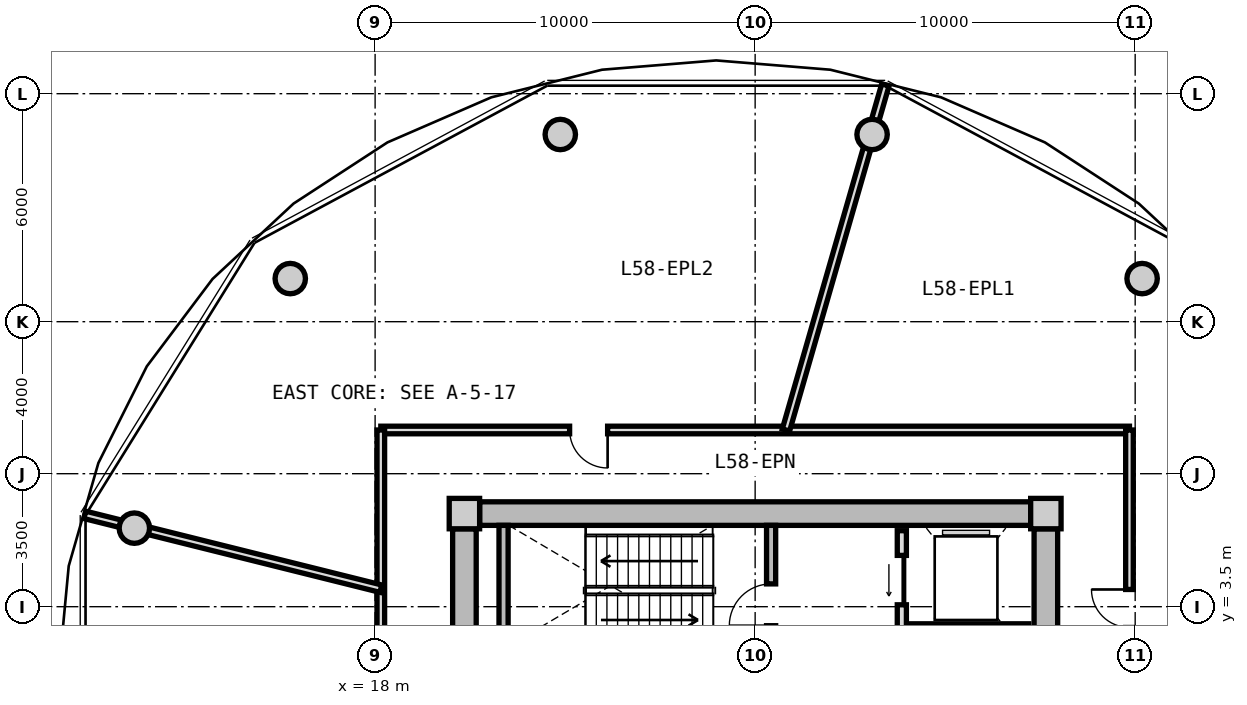
"""IFC4 building model, lengths in metres.
Left out: names, types, materials, properties, quantities, classifications, styles, units other than length and angle.
Written with IfcOpenShell. Run it as: python <this file> out.ifc"""

import sys

from ifc_helpers import new_model, si_unit, direction, frame, frame_2d, origin, origin_2d, place, context, subcontext, project, spatial, rectangle, circle, extrude, source, transform, mapped, element, fill, save


model = new_model("IFC4")
c1 = context("Model", 3, precision=1e-05, world=origin(), true_north=direction((0.0, 1.0)))
c2 = subcontext(c1, "Body", "Model", "MODEL_VIEW")
j1 = project(units=[si_unit("LENGTHUNIT", "METRE"), si_unit("PLANEANGLEUNIT", "RADIAN")], contexts=[c1])
p1 = place(None, origin())
s1 = spatial("IfcSite", under=j1, at=p1, CompositionType="ELEMENT")
p2 = place(p1, origin())
s2 = spatial("IfcBuilding", under=s1, at=p2, CompositionType="ELEMENT")
p3 = place(p2, frame((0.0, 0.0, 186.15)))
s3 = spatial("IfcBuildingStorey", under=s2, at=p3, CompositionType="ELEMENT", Elevation=186.15)
m1 = source(origin(), c2, "Body", "SweptSolid", [
    extrude(rectangle(XDim=0.8, YDim=0.8, at=origin_2d()), origin(), (0.0, 0.0, 1.0), 4.5),
])
for number, where, z_axis, x_axis in (
    (1, (35.65, 5.95, 0.0), (0.0, 0.0, 1.0), (1.0, 0.0, 0.0)),
    (2, (20.35, 5.95, 0.0), (0.0, 0.0, 1.0), (1.0, 0.0, 0.0)),
):
    element("IfcColumn", number, at=place(p3, frame(where, z_axis=z_axis, x_axis=x_axis)), inside=s3, PredefinedType="COLUMN", context=c2, shape_type="MappedRepresentation", body=[
        mapped(m1, transform((0.0, 0.0, 0.0), x_axis=(1.0, 0.0, 0.0), y_axis=(0.0, 1.0, 0.0), z_axis=(0.0, 0.0, 1.0), scale=1.0)),
    ])
m2 = source(origin(), c2, "Body", "SweptSolid", [
    extrude(rectangle(XDim=14.5, YDim=0.62, at=frame_2d((7.25, 0.0))), origin(), (0.0, 0.0, 1.0), 4.08),
])
p4 = place(p3, frame((20.75, 5.95, 0.0), z_axis=(0.0, 0.0, 1.0), x_axis=(1.0, 0.0, 0.0)))
e3 = element("IfcWall", 3, at=p4, inside=s3, PredefinedType="SHEAR", context=c2, shape_type="MappedRepresentation", body=[
    mapped(m2, transform((0.0, 0.0, 0.0), x_axis=(1.0, 0.0, 0.0), y_axis=(0.0, 1.0, 0.0), z_axis=(0.0, 0.0, 1.0), scale=1.0)),
])
m3 = source(origin(), c2, "Body", "SweptSolid", [
    extrude(rectangle(XDim=11.1, YDim=0.62, at=frame_2d((5.55, 0.0))), origin(), (0.0, 0.0, 1.0), 4.08),
])
p5 = place(p3, frame((20.35, -5.55, 0.0), z_axis=(0.0, 0.0, 1.0), x_axis=(0.0, 1.0, 0.0)))
e4 = element("IfcWall", 4, at=p5, inside=s3, PredefinedType="SHEAR", context=c2, shape_type="MappedRepresentation", body=[
    mapped(m3, transform((0.0, 0.0, 0.0), x_axis=(1.0, 0.0, 0.0), y_axis=(0.0, 1.0, 0.0), z_axis=(0.0, 0.0, 1.0), scale=1.0)),
])
p6 = place(p5, frame((3.8, 0.0, 0.0)))
e5 = element("IfcOpeningElement", 5, at=p6, cuts=e4, PredefinedType="OPENING", context=c2, shape_type="SweptSolid", body=[
    extrude(rectangle(XDim=1.2, YDim=2.15, at=frame_2d((0.6, 1.075))), frame((0.0, 0.32, 0.0), z_axis=(0.0, -1.0, 0.0), x_axis=(1.0, 0.0, 0.0)), (0.0, 0.0, 1.0), 0.64),
])
p7 = place(p3, frame((35.65, 5.55, 0.0), z_axis=(0.0, 0.0, 1.0), x_axis=(0.0, -1.0, 0.0)))
e6 = element("IfcWall", 6, at=p7, inside=s3, PredefinedType="SHEAR", context=c2, shape_type="MappedRepresentation", body=[
    mapped(m3, transform((0.0, 0.0, 0.0), x_axis=(1.0, 0.0, 0.0), y_axis=(0.0, 1.0, 0.0), z_axis=(0.0, 0.0, 1.0), scale=1.0)),
])
p8 = place(p7, frame((5.65, 0.0, 0.0)))
e7 = element("IfcOpeningElement", 7, at=p8, cuts=e6, PredefinedType="OPENING", context=c2, shape_type="SweptSolid", body=[
    extrude(rectangle(XDim=1.2, YDim=2.15, at=frame_2d((0.6, 1.075))), frame((0.0, 0.32, 0.0), z_axis=(0.0, -1.0, 0.0), x_axis=(1.0, 0.0, 0.0)), (0.0, 0.0, 1.0), 0.64),
])
p9 = place(p7, frame((9.3, 0.0, 0.0)))
e8 = element("IfcOpeningElement", 8, at=p9, cuts=e6, PredefinedType="OPENING", context=c2, shape_type="SweptSolid", body=[
    extrude(rectangle(XDim=1.0, YDim=2.1, at=frame_2d((0.5, 1.05))), frame((0.0, 0.32, 0.0), z_axis=(0.0, -1.0, 0.0), x_axis=(1.0, 0.0, 0.0)), (0.0, 0.0, 1.0), 0.64),
])
m4 = source(origin(), c2, "Body", "SweptSolid", [
    extrude(circle(Radius=0.4, at=origin_2d()), origin(), (0.0, 0.0, 1.0), 4.08),
])
for number, where, z_axis, x_axis in (
    (9, (38.183, 12.135, 0.0), (0.0, 0.0, 1.0), (1.0, 0.0, 0.0)),
    (10, (31.077, 15.926, 0.0), (0.0, 0.0, 1.0), (1.0, 0.0, 0.0)),
    (11, (22.873, 15.926, 0.0), (0.0, 0.0, 1.0), (1.0, 0.0, 0.0)),
    (12, (15.767, 12.135, 0.0), (0.0, 0.0, 1.0), (1.0, 0.0, 0.0)),
    (13, (11.665, 5.567, 0.0), (0.0, 0.0, 1.0), (1.0, 0.0, 0.0)),
):
    element("IfcColumn", number, at=place(p3, frame(where, z_axis=z_axis, x_axis=x_axis)), inside=s3, PredefinedType="COLUMN", context=c2, shape_type="MappedRepresentation", body=[
        mapped(m4, transform((0.0, 0.0, 0.0), x_axis=(1.0, 0.0, 0.0), y_axis=(0.0, 1.0, 0.0), z_axis=(0.0, 0.0, 1.0), scale=1.0)),
    ])
m5 = source(origin(), c2, "Body", "SweptSolid", [
    extrude(rectangle(XDim=3.19, YDim=0.24, at=frame_2d((1.595, 0.0))), origin(), (0.0, 0.0, 1.0), 4.08),
])
p10 = place(p3, frame((21.38, 2.45, 0.0), z_axis=(0.0, 0.0, 1.0), x_axis=(0.0, 1.0, 0.0)))
e14 = element("IfcWall", 14, at=p10, inside=s3, PredefinedType="PARTITIONING", context=c2, shape_type="MappedRepresentation", body=[
    mapped(m5, transform((0.0, 0.0, 0.0), x_axis=(1.0, 0.0, 0.0), y_axis=(0.0, 1.0, 0.0), z_axis=(0.0, 0.0, 1.0), scale=1.0)),
])
p11 = place(p3, frame((28.42, 2.45, 0.0), z_axis=(0.0, 0.0, 1.0), x_axis=(0.0, 1.0, 0.0)))
e15 = element("IfcWall", 15, at=p11, inside=s3, PredefinedType="PARTITIONING", context=c2, shape_type="MappedRepresentation", body=[
    mapped(m5, transform((0.0, 0.0, 0.0), x_axis=(1.0, 0.0, 0.0), y_axis=(0.0, 1.0, 0.0), z_axis=(0.0, 0.0, 1.0), scale=1.0)),
])
p12 = place(p11, frame((0.55, 0.0, 0.0)))
e16 = element("IfcOpeningElement", 16, at=p12, cuts=e15, PredefinedType="OPENING", context=c2, shape_type="SweptSolid", body=[
    extrude(rectangle(XDim=1.1, YDim=2.15, at=frame_2d((0.55, 1.075))), frame((0.0, 0.13, 0.0), z_axis=(0.0, -1.0, 0.0), x_axis=(1.0, 0.0, 0.0)), (0.0, 0.0, 1.0), 0.26),
])
m6 = source(origin(), c2, "Body", "SweptSolid", [
    extrude(rectangle(XDim=5.0, YDim=0.24, at=frame_2d((2.5, 0.0))), origin(), (0.0, 0.0, 1.0), 4.065),
])
p13 = place(p3, frame((31.86, 0.5, 0.0), z_axis=(0.0, 0.0, 1.0), x_axis=(0.0, 1.0, 0.0)))
e17 = element("IfcWall", 17, at=p13, inside=s3, PredefinedType="PARTITIONING", context=c2, shape_type="MappedRepresentation", body=[
    mapped(m6, transform((0.0, 0.0, 0.0), x_axis=(1.0, 0.0, 0.0), y_axis=(0.0, 1.0, 0.0), z_axis=(0.0, 0.0, 1.0), scale=1.0)),
])
p14 = place(p13, frame((3.05, 0.0, 0.0)))
e18 = element("IfcOpeningElement", 18, at=p14, cuts=e17, PredefinedType="OPENING", context=c2, shape_type="SweptSolid", body=[
    extrude(rectangle(XDim=1.3, YDim=2.2, at=frame_2d((0.65, 1.1))), frame((0.0, 0.13, 0.0), z_axis=(0.0, -1.0, 0.0), x_axis=(1.0, 0.0, 0.0)), (0.0, 0.0, 1.0), 0.26),
])
p15 = place(p13, frame((0.55, 0.0, 0.0)))
e19 = element("IfcOpeningElement", 19, at=p15, cuts=e17, PredefinedType="OPENING", context=c2, shape_type="SweptSolid", body=[
    extrude(rectangle(XDim=1.3, YDim=2.2, at=frame_2d((0.65, 1.1))), frame((0.0, 0.13, 0.0), z_axis=(0.0, -1.0, 0.0), x_axis=(1.0, 0.0, 0.0)), (0.0, 0.0, 1.0), 0.26),
])
m7 = source(origin(), c2, "Body", "SweptSolid", [
    extrude(rectangle(XDim=3.2, YDim=0.2, at=frame_2d((1.6, 0.0))), origin(), (0.0, 0.0, 1.0), 4.065),
])
p16 = place(p3, frame((32.0, 2.95, 0.0), z_axis=(0.0, 0.0, 1.0), x_axis=(1.0, 0.0, 0.0)))
e20 = element("IfcWall", 20, at=p16, inside=s3, PredefinedType="PARTITIONING", context=c2, shape_type="MappedRepresentation", body=[
    mapped(m7, transform((0.0, 0.0, 0.0), x_axis=(1.0, 0.0, 0.0), y_axis=(0.0, 1.0, 0.0), z_axis=(0.0, 0.0, 1.0), scale=1.0)),
])
m8 = source(origin(), c2, "Body", "SweptSolid", [
    extrude(rectangle(XDim=19.7, YDim=0.2, at=frame_2d((9.85, 0.0))), origin(), (0.0, 0.0, 1.0), 4.065),
])
p17 = place(p3, frame((18.15, 8.15, 0.0), z_axis=(0.0, 0.0, 1.0), x_axis=(1.0, 0.0, 0.0)))
e21 = element("IfcWall", 21, at=p17, inside=s3, PredefinedType="PARTITIONING", context=c2, shape_type="MappedRepresentation", body=[
    mapped(m8, transform((0.0, 0.0, 0.0), x_axis=(1.0, 0.0, 0.0), y_axis=(0.0, 1.0, 0.0), z_axis=(0.0, 0.0, 1.0), scale=1.0)),
])
p18 = place(p17, frame((4.968, 0.0, 0.0)))
e22 = element("IfcOpeningElement", 22, at=p18, cuts=e21, PredefinedType="OPENING", context=c2, shape_type="SweptSolid", body=[
    extrude(rectangle(XDim=1.0, YDim=2.1, at=frame_2d((0.5, 1.05))), frame((0.0, 0.11, 0.0), z_axis=(0.0, -1.0, 0.0), x_axis=(1.0, 0.0, 0.0)), (0.0, 0.0, 1.0), 0.22),
])
m9 = source(origin(), c2, "Body", "SweptSolid", [
    extrude(rectangle(XDim=16.3, YDim=0.2, at=frame_2d((8.15, 0.0))), origin(), (0.0, 0.0, 1.0), 4.065),
])
p19 = place(p3, frame((18.15, -8.15, 0.0), z_axis=(0.0, 0.0, 1.0), x_axis=(0.0, 1.0, 0.0)))
e23 = element("IfcWall", 23, at=p19, inside=s3, PredefinedType="PARTITIONING", context=c2, shape_type="MappedRepresentation", body=[
    mapped(m9, transform((0.0, 0.0, 0.0), x_axis=(1.0, 0.0, 0.0), y_axis=(0.0, 1.0, 0.0), z_axis=(0.0, 0.0, 1.0), scale=1.0)),
])
p20 = place(p19, frame((5.715, 0.0, 0.0)))
e24 = element("IfcOpeningElement", 24, at=p20, cuts=e23, PredefinedType="OPENING", context=c2, shape_type="SweptSolid", body=[
    extrude(rectangle(XDim=1.0, YDim=2.1, at=frame_2d((0.5, 1.05))), frame((0.0, 0.11, 0.0), z_axis=(0.0, -1.0, 0.0), x_axis=(1.0, 0.0, 0.0)), (0.0, 0.0, 1.0), 0.22),
])
p21 = place(p3, frame((37.85, 8.15, 0.0), z_axis=(0.0, 0.0, 1.0), x_axis=(0.0, -1.0, 0.0)))
e25 = element("IfcWall", 25, at=p21, inside=s3, PredefinedType="PARTITIONING", context=c2, shape_type="MappedRepresentation", body=[
    mapped(m9, transform((0.0, 0.0, 0.0), x_axis=(1.0, 0.0, 0.0), y_axis=(0.0, 1.0, 0.0), z_axis=(0.0, 0.0, 1.0), scale=1.0)),
])
p22 = place(p21, frame((4.197, 0.0, 0.0)))
e26 = element("IfcOpeningElement", 26, at=p22, cuts=e25, PredefinedType="OPENING", context=c2, shape_type="SweptSolid", body=[
    extrude(rectangle(XDim=1.0, YDim=2.1, at=frame_2d((0.5, 1.05))), frame((0.0, 0.11, 0.0), z_axis=(0.0, -1.0, 0.0), x_axis=(1.0, 0.0, 0.0)), (0.0, 0.0, 1.0), 0.22),
])
m10 = source(origin(), c2, "Body", "SweptSolid", [
    extrude(rectangle(XDim=9.449, YDim=0.2, at=frame_2d((4.725, 0.0))), origin(), (0.0, 0.0, 1.0), 4.065),
])
p23 = place(p3, frame((28.811, 8.15, 0.0), z_axis=(0.0, 0.0, 1.0), x_axis=(0.276784966388, 0.96093188228, 0.0)))
e27 = element("IfcWall", 27, at=p23, inside=s3, PredefinedType="PARTITIONING", context=c2, shape_type="MappedRepresentation", body=[
    mapped(m10, transform((0.0, 0.0, 0.0), x_axis=(1.0, 0.0, 0.0), y_axis=(0.0, 1.0, 0.0), z_axis=(0.0, 0.0, 1.0), scale=1.0)),
])
m11 = source(origin(), c2, "Body", "SweptSolid", [
    extrude(rectangle(XDim=8.027, YDim=0.2, at=frame_2d((4.014, 0.0))), origin(), (0.0, 0.0, 1.0), 4.065),
])
p24 = place(p3, frame((18.15, 3.975, 0.0), z_axis=(0.0, 0.0, 1.0), x_axis=(-0.970312225041, 0.241855713053, 0.0)))
e28 = element("IfcWall", 28, at=p24, inside=s3, PredefinedType="PARTITIONING", context=c2, shape_type="MappedRepresentation", body=[
    mapped(m11, transform((0.0, 0.0, 0.0), x_axis=(1.0, 0.0, 0.0), y_axis=(0.0, 1.0, 0.0), z_axis=(0.0, 0.0, 1.0), scale=1.0)),
])
m12 = source(origin(), c2, "Body", "SweptSolid", [
    extrude(rectangle(XDim=1.1, YDim=2.15, at=frame_2d((0.55, 1.075))), frame((0.0, 0.025, 0.0), z_axis=(0.0, -1.0, 0.0), x_axis=(1.0, 0.0, 0.0)), (0.0, 0.0, 1.0), 0.05),
])
p25 = place(p12, origin())
e29 = element("IfcDoor", 29, at=p25, inside=s3, OperationType="SINGLE_SWING_LEFT", PredefinedType="DOOR", context=c2, shape_type="MappedRepresentation", body=[
    mapped(m12, transform((0.0, 0.0, 0.0), x_axis=(1.0, 0.0, 0.0), y_axis=(0.0, 1.0, 0.0), z_axis=(0.0, 0.0, 1.0), scale=1.0)),
])
fill(e16, e29)
m13 = source(origin(), c2, "Body", "SweptSolid", [
    extrude(rectangle(XDim=1.3, YDim=2.2, at=frame_2d((0.65, 1.1))), frame((0.0, 0.025, 0.0), z_axis=(0.0, -1.0, 0.0), x_axis=(1.0, 0.0, 0.0)), (0.0, 0.0, 1.0), 0.05),
])
p26 = place(p14, origin())
e30 = element("IfcDoor", 30, at=p26, inside=s3, OperationType="SLIDING_TO_LEFT", PredefinedType="DOOR", context=c2, shape_type="MappedRepresentation", body=[
    mapped(m13, transform((0.0, 0.0, 0.0), x_axis=(1.0, 0.0, 0.0), y_axis=(0.0, 1.0, 0.0), z_axis=(0.0, 0.0, 1.0), scale=1.0)),
])
fill(e18, e30)
m14 = source(origin(), c2, "Body", "SweptSolid", [
    extrude(rectangle(XDim=1.0, YDim=2.1, at=frame_2d((0.5, 1.05))), frame((0.0, 0.025, 0.0), z_axis=(0.0, -1.0, 0.0), x_axis=(1.0, 0.0, 0.0)), (0.0, 0.0, 1.0), 0.05),
])
p27 = place(p22, frame((1.0, 0.0, 0.0), z_axis=(0.0, 0.0, 1.0), x_axis=(-1.0, 0.0, 0.0)))
e31 = element("IfcDoor", 31, at=p27, inside=s3, OperationType="SINGLE_SWING_RIGHT", PredefinedType="DOOR", context=c2, shape_type="MappedRepresentation", body=[
    mapped(m14, transform((0.0, 0.0, 0.0), x_axis=(1.0, 0.0, 0.0), y_axis=(0.0, 1.0, 0.0), z_axis=(0.0, 0.0, 1.0), scale=1.0)),
])
fill(e26, e31)
p28 = place(p18, frame((1.0, 0.0, 0.0), z_axis=(0.0, 0.0, 1.0), x_axis=(-1.0, 0.0, 0.0)))
e32 = element("IfcDoor", 32, at=p28, inside=s3, OperationType="SINGLE_SWING_LEFT", PredefinedType="DOOR", context=c2, shape_type="MappedRepresentation", body=[
    mapped(m14, transform((0.0, 0.0, 0.0), x_axis=(1.0, 0.0, 0.0), y_axis=(0.0, 1.0, 0.0), z_axis=(0.0, 0.0, 1.0), scale=1.0)),
])
fill(e22, e32)
save(model, sys.argv[1])
